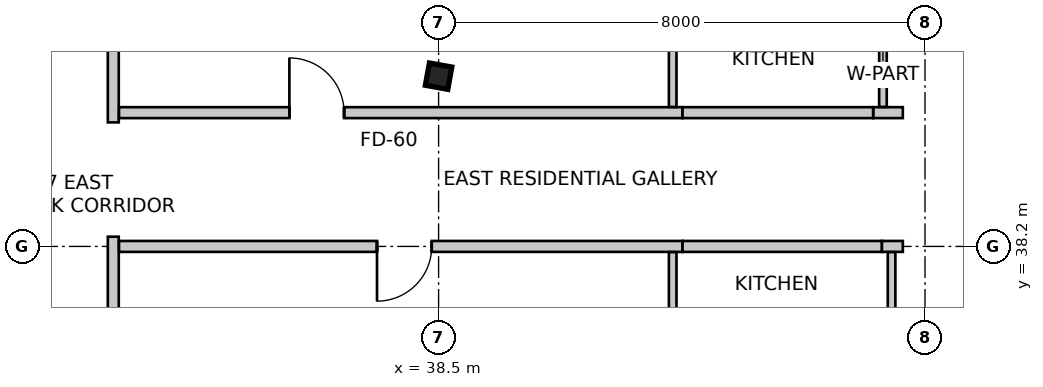
"""IFC4 building model, lengths in metres.
Left out: names, types, materials, properties, quantities, classifications, styles, units other than length and angle.
Written with IfcOpenShell. Run it as: python <this file> out.ifc"""

import sys

from ifc_helpers import new_model, si_unit, direction, frame, frame_2d, origin, origin_2d, place, context, subcontext, project, spatial, rectangle, i_section, extrude, source, transform, mapped, element, fill, save


model = new_model("IFC4")
c1 = context("Model", 3, precision=1e-05, world=origin(), true_north=direction((0.0, 1.0)))
c2 = subcontext(c1, "Body", "Model", "MODEL_VIEW")
j1 = project(units=[si_unit("LENGTHUNIT", "METRE"), si_unit("PLANEANGLEUNIT", "RADIAN")], contexts=[c1])
p1 = place(None, origin())
s1 = spatial("IfcSite", under=j1, at=p1, CompositionType="ELEMENT")
p2 = place(p1, origin())
s2 = spatial("IfcBuilding", under=s1, at=p2, CompositionType="ELEMENT")
p3 = place(p2, frame((0.0, 0.0, 190.4)))
s3 = spatial("IfcBuildingStorey", under=s2, at=p3, CompositionType="ELEMENT", Elevation=190.4)
m1 = source(origin(), c2, "Body", "SweptSolid", [
    extrude(i_section(OverallWidth=0.374, OverallDepth=0.372, WebThickness=0.016, FlangeThickness=0.026, FilletRadius=0.015, at=origin_2d()), origin(), (0.0, 0.0, 1.0), 3.5),
])
p4 = place(p3, frame((38.5, 41.0, 0.0), z_axis=(0.0, 0.0, 1.0), x_axis=(0.984195607969, -0.17708474032, 0.0)))
e1 = element("IfcColumn", 1, at=p4, inside=s3, PredefinedType="COLUMN", context=c2, shape_type="MappedRepresentation", body=[
    mapped(m1, transform((0.0, 0.0, 0.0), scale=1.0)),
])
p5 = place(p3, frame((33.15, 45.766, 0.0), z_axis=(0.0, 0.0, 1.0), x_axis=(0.0, -1.0, 0.0)))
e2 = element("IfcWall", 2, at=p5, inside=s3, PredefinedType="PARTITIONING", context=c2, shape_type="SweptSolid", body=[
    extrude(rectangle(XDim=5.526, YDim=0.18, at=frame_2d((2.763, 0.0))), origin(), (0.0, 0.0, 1.0), 2.822),
])
p6 = place(p3, frame((33.15, 38.36, 0.0), z_axis=(0.0, 0.0, 1.0), x_axis=(0.0, -1.0, 0.0)))
e3 = element("IfcWall", 3, at=p6, inside=s3, PredefinedType="PARTITIONING", context=c2, shape_type="SweptSolid", body=[
    extrude(rectangle(XDim=2.16, YDim=0.18, at=frame_2d((1.08, 0.0))), origin(), (0.0, 0.0, 1.0), 3.25),
])
p7 = place(p3, frame((45.648, 40.4, 0.0), z_axis=(0.0, 0.0, 1.0), x_axis=(1.0, 0.0, 0.0)))
e4 = element("IfcWall", 4, at=p7, inside=s3, PredefinedType="PARTITIONING", context=c2, shape_type="SweptSolid", body=[
    extrude(rectangle(XDim=0.487, YDim=0.18, at=frame_2d((0.244, 0.0))), origin(), (0.0, 0.0, 1.0), 3.25),
])
p8 = place(p3, frame((33.244, 40.4, 0.0), z_axis=(0.0, 0.0, 1.0), x_axis=(1.0, 0.0, 0.0)))
e5 = element("IfcWall", 5, at=p8, inside=s3, PredefinedType="PARTITIONING", context=c2, shape_type="SweptSolid", body=[
    extrude(rectangle(XDim=9.266, YDim=0.18, at=frame_2d((4.633, 0.0))), origin(), (0.0, 0.0, 1.0), 2.766),
])
m2 = source(origin(), c2, "Body", "SweptSolid", [
    extrude(rectangle(XDim=0.9, YDim=2.15, at=frame_2d((0.45, 1.075))), frame((0.0, 0.1, 0.0), z_axis=(0.0, -1.0, 0.0), x_axis=(1.0, 0.0, 0.0)), (0.0, 0.0, 1.0), 0.2),
])
p9 = place(p8, frame((2.802, 0.0, 0.0)))
e6 = element("IfcOpeningElement", 6, at=p9, cuts=e5, PredefinedType="OPENING", context=c2, shape_type="MappedRepresentation", body=[
    mapped(m2, transform((0.0, 0.0, 0.0), scale=1.0)),
])
p10 = place(p3, frame((42.512, 40.4, 0.0), z_axis=(0.0, 0.0, 1.0), x_axis=(1.0, 0.0, 0.0)))
e7 = element("IfcWall", 7, at=p10, inside=s3, PredefinedType="PARTITIONING", context=c2, shape_type="SweptSolid", body=[
    extrude(rectangle(XDim=3.134, YDim=0.18, at=frame_2d((1.567, 0.0))), origin(), (0.0, 0.0, 1.0), 2.822),
])
p11 = place(p3, frame((46.135, 38.2, 0.0), z_axis=(0.0, 0.0, 1.0), x_axis=(-1.0, 0.0, 0.0)))
e8 = element("IfcWall", 8, at=p11, inside=s3, PredefinedType="PARTITIONING", context=c2, shape_type="SweptSolid", body=[
    extrude(rectangle(XDim=0.345, YDim=0.18, at=frame_2d((0.172, 0.0))), origin(), (0.0, 0.0, 1.0), 3.25),
])
p12 = place(p3, frame((42.51, 38.2, 0.0), z_axis=(0.0, 0.0, 1.0), x_axis=(-1.0, 0.0, 0.0)))
e9 = element("IfcWall", 9, at=p12, inside=s3, PredefinedType="PARTITIONING", context=c2, shape_type="SweptSolid", body=[
    extrude(rectangle(XDim=9.266, YDim=0.18, at=frame_2d((4.633, 0.0))), origin(), (0.0, 0.0, 1.0), 2.766),
])
p13 = place(p12, frame((4.123, 0.0, 0.0)))
e10 = element("IfcOpeningElement", 10, at=p13, cuts=e9, PredefinedType="OPENING", context=c2, shape_type="MappedRepresentation", body=[
    mapped(m2, transform((0.0, 0.0, 0.0), scale=1.0)),
])
p14 = place(p3, frame((45.788, 38.2, 0.0), z_axis=(0.0, 0.0, 1.0), x_axis=(-1.0, 0.0, 0.0)))
e11 = element("IfcWall", 11, at=p14, inside=s3, PredefinedType="PARTITIONING", context=c2, shape_type="SweptSolid", body=[
    extrude(rectangle(XDim=3.276, YDim=0.18, at=frame_2d((1.638, 0.0))), origin(), (0.0, 0.0, 1.0), 2.822),
])
p15 = place(p3, frame((45.808, 40.494, 0.0), z_axis=(0.0, 0.0, 1.0), x_axis=(0.0, 1.0, 0.0)))
e12 = element("IfcWall", 12, at=p15, inside=s3, PredefinedType="PARTITIONING", context=c2, shape_type="SweptSolid", body=[
    extrude(rectangle(XDim=5.112, YDim=0.125, at=frame_2d((2.556, 0.0))), origin(), (0.0, 0.0, 1.0), 2.822),
])
m3 = source(origin(), c2, "Body", "SweptSolid", [
    extrude(rectangle(XDim=0.9, YDim=2.15, at=frame_2d((0.45, 1.075))), frame((0.0, 0.073, 0.0), z_axis=(0.0, -1.0, 0.0), x_axis=(1.0, 0.0, 0.0)), (0.0, 0.0, 1.0), 0.145),
])
p16 = place(p15, frame((2.106, 0.0, 0.0)))
e13 = element("IfcOpeningElement", 13, at=p16, cuts=e12, PredefinedType="OPENING", context=c2, shape_type="MappedRepresentation", body=[
    mapped(m3, transform((0.0, 0.0, 0.0), scale=1.0)),
])
p17 = place(p3, frame((42.35, 45.606, 0.0), z_axis=(0.0, 0.0, 1.0), x_axis=(0.0, -1.0, 0.0)))
e14 = element("IfcWall", 14, at=p17, inside=s3, PredefinedType="PARTITIONING", context=c2, shape_type="SweptSolid", body=[
    extrude(rectangle(XDim=5.112, YDim=0.125, at=frame_2d((2.556, 0.0))), origin(), (0.0, 0.0, 1.0), 2.934),
])
m4 = source(origin(), c2, "Body", "SweptSolid", [
    extrude(rectangle(XDim=0.85, YDim=2.15, at=frame_2d((0.425, 1.075))), frame((0.0, 0.073, 0.0), z_axis=(0.0, -1.0, 0.0), x_axis=(1.0, 0.0, 0.0)), (0.0, 0.0, 1.0), 0.145),
])
p18 = place(p17, frame((2.131, 0.0, 0.0)))
e15 = element("IfcOpeningElement", 15, at=p18, cuts=e14, PredefinedType="OPENING", context=c2, shape_type="MappedRepresentation", body=[
    mapped(m4, transform((0.0, 0.0, 0.0), scale=1.0)),
])
p19 = place(p3, frame((45.95, 34.95, 0.0), z_axis=(0.0, 0.0, 1.0), x_axis=(0.0, 1.0, 0.0)))
e16 = element("IfcWall", 16, at=p19, inside=s3, PredefinedType="PARTITIONING", context=c2, shape_type="SweptSolid", body=[
    extrude(rectangle(XDim=3.156, YDim=0.125, at=frame_2d((1.578, 0.0))), origin(), (0.0, 0.0, 1.0), 2.542),
])
p20 = place(p19, frame((1.128, 0.0, 0.0)))
e17 = element("IfcOpeningElement", 17, at=p20, cuts=e16, PredefinedType="OPENING", context=c2, shape_type="MappedRepresentation", body=[
    mapped(m3, transform((0.0, 0.0, 0.0), scale=1.0)),
])
p21 = place(p3, frame((42.35, 38.106, 0.0), z_axis=(0.0, 0.0, 1.0), x_axis=(0.0, -1.0, 0.0)))
e18 = element("IfcWall", 18, at=p21, inside=s3, PredefinedType="PARTITIONING", context=c2, shape_type="SweptSolid", body=[
    extrude(rectangle(XDim=3.156, YDim=0.125, at=frame_2d((1.578, 0.0))), origin(), (0.0, 0.0, 1.0), 2.542),
])
p22 = place(p21, frame((1.153, 0.0, 0.0)))
e19 = element("IfcOpeningElement", 19, at=p22, cuts=e18, PredefinedType="OPENING", context=c2, shape_type="MappedRepresentation", body=[
    mapped(m4, transform((0.0, 0.0, 0.0), scale=1.0)),
])
m5 = source(origin(), c2, "Body", "SweptSolid", [
    extrude(rectangle(XDim=0.9, YDim=2.15, at=frame_2d((0.45, 1.075))), frame((0.0, 0.025, 0.0), z_axis=(0.0, -1.0, 0.0), x_axis=(1.0, 0.0, 0.0)), (0.0, 0.0, 1.0), 0.05),
])
p23 = place(p9, origin())
e20 = element("IfcDoor", 20, at=p23, inside=s3, OperationType="SINGLE_SWING_LEFT", PredefinedType="DOOR", context=c2, shape_type="MappedRepresentation", body=[
    mapped(m5, transform((0.0, 0.0, 0.0), scale=1.0)),
])
fill(e6, e20)
p24 = place(p13, origin())
e21 = element("IfcDoor", 21, at=p24, inside=s3, OperationType="SINGLE_SWING_RIGHT", PredefinedType="DOOR", context=c2, shape_type="MappedRepresentation", body=[
    mapped(m5, transform((0.0, 0.0, 0.0), scale=1.0)),
])
fill(e10, e21)
save(model, sys.argv[1])
